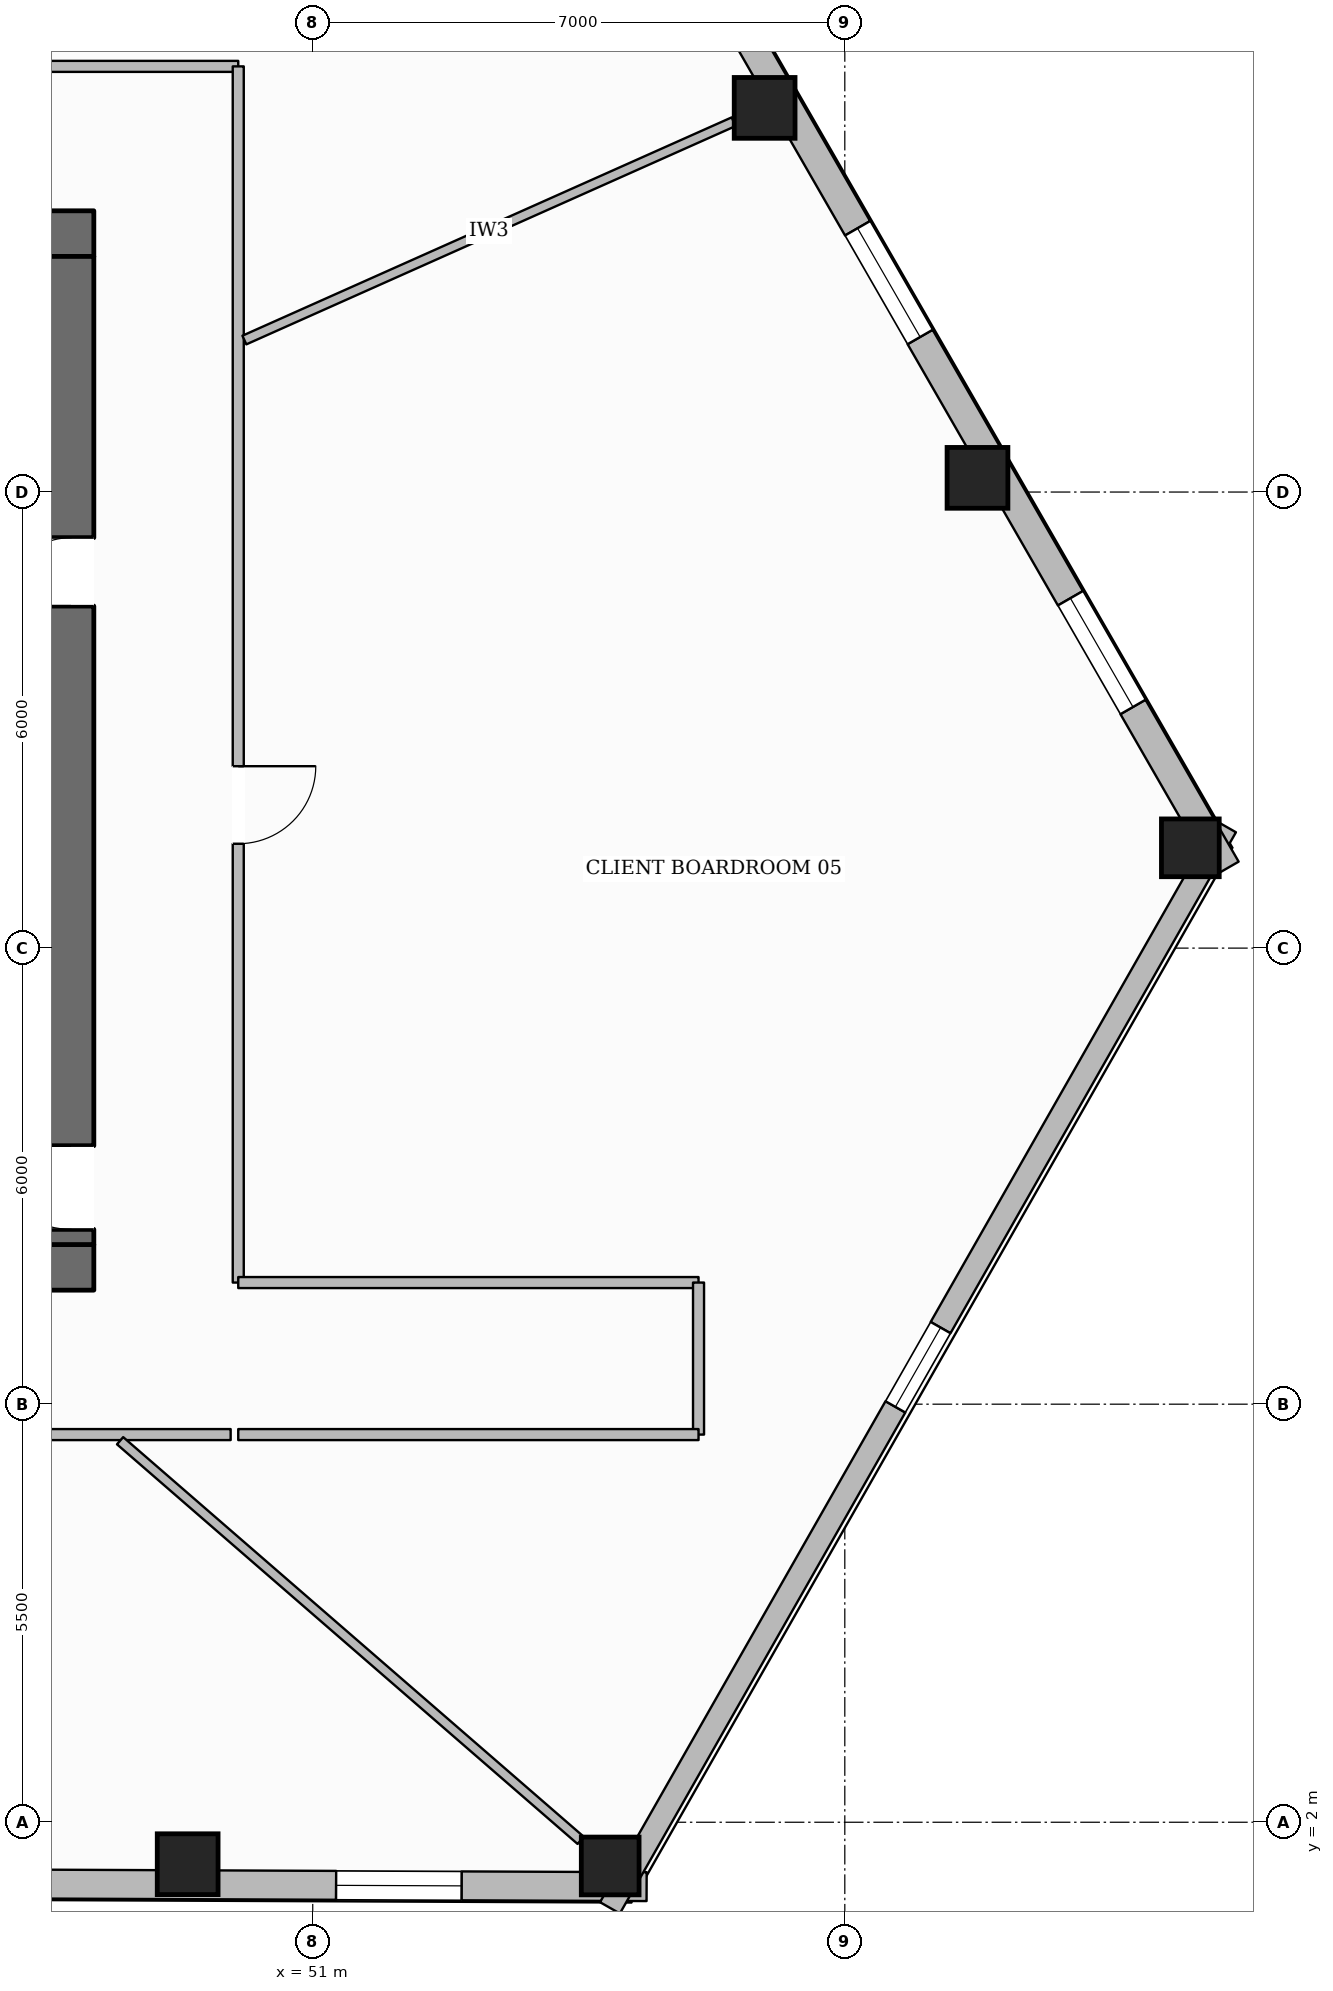
"""IFC4 building model, lengths in metres.
Left out: names, types, materials, properties, quantities, classifications, styles, units other than length and angle.
Written with IfcOpenShell. Run it as: python <this file> out.ifc"""

import sys

from ifc_helpers import new_model, si_unit, direction, frame, frame_2d, origin, origin_2d, place, context, subcontext, project, spatial, rectangle, hollow_rectangle, extrude, element, fill, save


model = new_model("IFC4")
c1 = context("Model", 3, precision=1e-05, world=origin(), true_north=direction((0.0, 1.0)))
c2 = subcontext(c1, "Body", "Model", "MODEL_VIEW")
j1 = project(units=[si_unit("LENGTHUNIT", "METRE"), si_unit("PLANEANGLEUNIT", "RADIAN")], contexts=[c1])
p1 = place(None, origin())
s1 = spatial("IfcSite", under=j1, at=p1, CompositionType="ELEMENT")
p2 = place(p1, origin())
s2 = spatial("IfcBuilding", under=s1, at=p2, CompositionType="ELEMENT")
p3 = place(p2, frame((0.0, 0.0, 36.8)))
s3 = spatial("IfcBuildingStorey", under=s2, at=p3, CompositionType="ELEMENT", Elevation=36.8)
p4 = place(p3, frame((27.88, 9.3, 0.0), z_axis=(0.0, 0.0, 1.0), x_axis=(1.0, 0.0, 0.0)))
e1 = element("IfcWall", 1, at=p4, inside=s3, PredefinedType="SOLIDWALL", context=c2, shape_type="SweptSolid", body=[
    extrude(rectangle(XDim=20.24, YDim=0.6, at=frame_2d((10.12, 0.0))), origin(), (0.0, 0.0, 1.0), 3.59),
])
p5 = place(p4, frame((10.62, 0.0, 0.0)))
e2 = element("IfcOpeningElement", 2, at=p5, cuts=e1, PredefinedType="OPENING", context=c2, shape_type="SweptSolid", body=[
    extrude(rectangle(XDim=1.4, YDim=2.2, at=frame_2d((0.7, 1.1))), frame((0.0, 0.31, 0.0), z_axis=(0.0, -1.0, 0.0), x_axis=(1.0, 0.0, 0.0)), (0.0, 0.0, 1.0), 0.62),
])
p6 = place(p3, frame((27.88, 22.9, 0.0), z_axis=(0.0, 0.0, 1.0), x_axis=(1.0, 0.0, 0.0)))
e3 = element("IfcWall", 3, at=p6, inside=s3, PredefinedType="SOLIDWALL", context=c2, shape_type="SweptSolid", body=[
    extrude(rectangle(XDim=20.24, YDim=0.6, at=frame_2d((10.12, 0.0))), origin(), (0.0, 0.0, 1.0), 3.59),
])
p7 = place(p6, frame((6.395, 0.0, 0.0)))
e4 = element("IfcOpeningElement", 4, at=p7, cuts=e3, PredefinedType="OPENING", context=c2, shape_type="SweptSolid", body=[
    extrude(rectangle(XDim=1.05, YDim=2.15, at=frame_2d((0.525, 1.075))), frame((0.0, 0.31, 0.0), z_axis=(0.0, -1.0, 0.0), x_axis=(1.0, 0.0, 0.0)), (0.0, 0.0, 1.0), 0.62),
])
p8 = place(p6, frame((12.795, 0.0, 0.0)))
e5 = element("IfcOpeningElement", 5, at=p8, cuts=e3, PredefinedType="OPENING", context=c2, shape_type="SweptSolid", body=[
    extrude(rectangle(XDim=1.05, YDim=2.15, at=frame_2d((0.525, 1.075))), frame((0.0, 0.31, 0.0), z_axis=(0.0, -1.0, 0.0), x_axis=(1.0, 0.0, 0.0)), (0.0, 0.0, 1.0), 0.62),
])
p9 = place(p3, frame((47.82, 9.6, 0.0), z_axis=(0.0, 0.0, 1.0), x_axis=(0.0, 1.0, 0.0)))
e6 = element("IfcWall", 6, at=p9, inside=s3, PredefinedType="SOLIDWALL", context=c2, shape_type="SweptSolid", body=[
    extrude(rectangle(XDim=13.0, YDim=0.6, at=frame_2d((6.5, 0.0))), origin(), (0.0, 0.0, 1.0), 3.59),
])
p10 = place(p9, frame((0.2, 0.0, 0.0)))
e7 = element("IfcOpeningElement", 7, at=p10, cuts=e6, PredefinedType="OPENING", context=c2, shape_type="SweptSolid", body=[
    extrude(rectangle(XDim=1.1, YDim=2.15, at=frame_2d((0.55, 1.075))), frame((0.0, 0.31, 0.0), z_axis=(0.0, -1.0, 0.0), x_axis=(1.0, 0.0, 0.0)), (0.0, 0.0, 1.0), 0.62),
])
p11 = place(p9, frame((8.4, 0.0, 0.0)))
e8 = element("IfcOpeningElement", 8, at=p11, cuts=e6, PredefinedType="OPENING", context=c2, shape_type="SweptSolid", body=[
    extrude(rectangle(XDim=0.9, YDim=2.1, at=frame_2d((0.45, 1.05))), frame((0.0, 0.31, 0.0), z_axis=(0.0, -1.0, 0.0), x_axis=(1.0, 0.0, 0.0)), (0.0, 0.0, 1.0), 0.62),
])
p12 = place(p3, frame((49.354, 1.448, 0.0), z_axis=(0.0, 0.0, 1.0), x_axis=(1.0, 0.0, 0.0)))
e9 = element("IfcColumn", 9, at=p12, inside=s3, PredefinedType="COLUMN", context=c2, shape_type="SweptSolid", body=[
    extrude(hollow_rectangle(XDim=0.8, YDim=0.8, WallThickness=0.036, at=origin_2d()), origin(), (0.0, 0.0, 1.0), 3.59),
])
for number, where, z_axis, x_axis in (
    (10, (54.913, 1.425, 0.0), (0.0, 0.0, 1.0), (1.0, 0.0, 0.0)),
    (11, (62.546, 14.82, 0.0), (0.0, 0.0, 1.0), (1.0, 0.0, 0.0)),
):
    element("IfcColumn", number, at=place(p3, frame(where, z_axis=z_axis, x_axis=x_axis)), inside=s3, PredefinedType="COLUMN", context=c2, shape_type="SweptSolid", body=[
        extrude(hollow_rectangle(XDim=0.76, YDim=0.76, WallThickness=0.035, at=origin_2d()), origin(), (0.0, 0.0, 1.0), 3.59),
    ])
for number, where, z_axis, x_axis in (
    (12, (59.746, 19.687, 0.0), (0.0, 0.0, 1.0), (1.0, 0.0, 0.0)),
    (13, (56.945, 24.554, 0.0), (0.0, 0.0, 1.0), (1.0, 0.0, 0.0)),
):
    element("IfcColumn", number, at=place(p3, frame(where, z_axis=z_axis, x_axis=x_axis)), inside=s3, PredefinedType="COLUMN", context=c2, shape_type="SweptSolid", body=[
        extrude(hollow_rectangle(XDim=0.8, YDim=0.8, WallThickness=0.036, at=origin_2d()), origin(), (0.0, 0.0, 1.0), 3.59),
    ])
p13 = place(p3, frame((55.393, 1.153, 0.0), z_axis=(0.0, 0.0, 1.0), x_axis=(-0.999991365452, 0.004155601268, 0.0)))
e14 = element("IfcWall", 14, at=p13, inside=s3, PredefinedType="STANDARD", context=c2, shape_type="SweptSolid", body=[
    extrude(rectangle(XDim=34.31, YDim=0.38, at=frame_2d((17.155, 0.0))), origin(), (0.0, 0.0, 1.0), 2.97),
])
p14 = place(p13, frame((30.229, 0.0, 0.65)))
e15 = element("IfcOpeningElement", 15, at=p14, cuts=e14, PredefinedType="OPENING", context=c2, shape_type="SweptSolid", body=[
    extrude(rectangle(XDim=1.65, YDim=1.75, at=frame_2d((0.825, 0.875))), frame((0.0, 0.2, 0.0), z_axis=(0.0, -1.0, 0.0), x_axis=(1.0, 0.0, 0.0)), (0.0, 0.0, 1.0), 0.4),
])
p15 = place(p13, frame((24.67, 0.0, 0.65)))
e16 = element("IfcOpeningElement", 16, at=p15, cuts=e14, PredefinedType="OPENING", context=c2, shape_type="SweptSolid", body=[
    extrude(rectangle(XDim=1.65, YDim=1.75, at=frame_2d((0.825, 0.875))), frame((0.0, 0.2, 0.0), z_axis=(0.0, -1.0, 0.0), x_axis=(1.0, 0.0, 0.0)), (0.0, 0.0, 1.0), 0.4),
])
p16 = place(p13, frame((13.552, 0.0, 0.65)))
e17 = element("IfcOpeningElement", 17, at=p16, cuts=e14, PredefinedType="OPENING", context=c2, shape_type="SweptSolid", body=[
    extrude(rectangle(XDim=1.65, YDim=1.75, at=frame_2d((0.825, 0.875))), frame((0.0, 0.2, 0.0), z_axis=(0.0, -1.0, 0.0), x_axis=(1.0, 0.0, 0.0)), (0.0, 0.0, 1.0), 0.4),
])
p17 = place(p13, frame((7.994, 0.0, 0.65)))
e18 = element("IfcOpeningElement", 18, at=p17, cuts=e14, PredefinedType="OPENING", context=c2, shape_type="SweptSolid", body=[
    extrude(rectangle(XDim=1.65, YDim=1.75, at=frame_2d((0.825, 0.875))), frame((0.0, 0.2, 0.0), z_axis=(0.0, -1.0, 0.0), x_axis=(1.0, 0.0, 0.0)), (0.0, 0.0, 1.0), 0.4),
])
p18 = place(p13, frame((2.435, 0.0, 0.65)))
e19 = element("IfcOpeningElement", 19, at=p18, cuts=e14, PredefinedType="OPENING", context=c2, shape_type="SweptSolid", body=[
    extrude(rectangle(XDim=1.65, YDim=1.75, at=frame_2d((0.825, 0.875))), frame((0.0, 0.2, 0.0), z_axis=(0.0, -1.0, 0.0), x_axis=(1.0, 0.0, 0.0)), (0.0, 0.0, 1.0), 0.4),
])
p19 = place(p3, frame((63.016, 15.098, 0.0), z_axis=(0.0, 0.0, 1.0), x_axis=(-0.495085083472, -0.86884449709, 0.0)))
e20 = element("IfcWall", 20, at=p19, inside=s3, PredefinedType="STANDARD", context=c2, shape_type="SweptSolid", body=[
    extrude(rectangle(XDim=16.372, YDim=0.3, at=frame_2d((8.186, 0.0))), origin(), (0.0, 0.0, 1.0), 2.97),
])
p20 = place(p19, frame((7.586, 0.0, 0.65)))
e21 = element("IfcOpeningElement", 21, at=p20, cuts=e20, PredefinedType="OPENING", context=c2, shape_type="SweptSolid", body=[
    extrude(rectangle(XDim=1.2, YDim=1.7, at=frame_2d((0.6, 0.85))), frame((0.0, 0.16, 0.0), z_axis=(0.0, -1.0, 0.0), x_axis=(1.0, 0.0, 0.0)), (0.0, 0.0, 1.0), 0.32),
])
p21 = place(p3, frame((45.74, 44.571, 0.0), z_axis=(0.0, 0.0, 1.0), x_axis=(0.498692886701, -0.866778751905, 0.0)))
e22 = element("IfcWall", 22, at=p21, inside=s3, PredefinedType="STANDARD", context=c2, shape_type="SweptSolid", body=[
    extrude(rectangle(XDim=34.643, YDim=0.38, at=frame_2d((17.322, 0.0))), origin(), (0.0, 0.0, 1.0), 2.97),
])
p22 = place(p21, frame((30.536, 0.0, 0.65)))
e23 = element("IfcOpeningElement", 23, at=p22, cuts=e22, PredefinedType="OPENING", context=c2, shape_type="SweptSolid", body=[
    extrude(rectangle(XDim=1.65, YDim=1.75, at=frame_2d((0.825, 0.875))), frame((0.0, 0.2, 0.0), z_axis=(0.0, -1.0, 0.0), x_axis=(1.0, 0.0, 0.0)), (0.0, 0.0, 1.0), 0.4),
])
p23 = place(p21, frame((24.92, 0.0, 0.65)))
e24 = element("IfcOpeningElement", 24, at=p23, cuts=e22, PredefinedType="OPENING", context=c2, shape_type="SweptSolid", body=[
    extrude(rectangle(XDim=1.65, YDim=1.75, at=frame_2d((0.825, 0.875))), frame((0.0, 0.2, 0.0), z_axis=(0.0, -1.0, 0.0), x_axis=(1.0, 0.0, 0.0)), (0.0, 0.0, 1.0), 0.4),
])
p24 = place(p21, frame((13.69, 0.0, 0.65)))
e25 = element("IfcOpeningElement", 25, at=p24, cuts=e22, PredefinedType="OPENING", context=c2, shape_type="SweptSolid", body=[
    extrude(rectangle(XDim=1.65, YDim=1.75, at=frame_2d((0.825, 0.875))), frame((0.0, 0.2, 0.0), z_axis=(0.0, -1.0, 0.0), x_axis=(1.0, 0.0, 0.0)), (0.0, 0.0, 1.0), 0.4),
])
p25 = place(p21, frame((8.074, 0.0, 0.65)))
e26 = element("IfcOpeningElement", 26, at=p25, cuts=e22, PredefinedType="OPENING", context=c2, shape_type="SweptSolid", body=[
    extrude(rectangle(XDim=1.65, YDim=1.75, at=frame_2d((0.825, 0.875))), frame((0.0, 0.2, 0.0), z_axis=(0.0, -1.0, 0.0), x_axis=(1.0, 0.0, 0.0)), (0.0, 0.0, 1.0), 0.4),
])
p26 = place(p21, frame((2.459, 0.0, 0.65)))
e27 = element("IfcOpeningElement", 27, at=p26, cuts=e22, PredefinedType="OPENING", context=c2, shape_type="SweptSolid", body=[
    extrude(rectangle(XDim=1.65, YDim=1.75, at=frame_2d((0.825, 0.875))), frame((0.0, 0.2, 0.0), z_axis=(0.0, -1.0, 0.0), x_axis=(1.0, 0.0, 0.0)), (0.0, 0.0, 1.0), 0.4),
])
p27 = place(p3, frame((39.0, 25.1, 0.0), z_axis=(0.0, 0.0, 1.0), x_axis=(1.0, 0.0, 0.0)))
e28 = element("IfcWall", 28, at=p27, inside=s3, PredefinedType="PARTITIONING", context=c2, shape_type="SweptSolid", body=[
    extrude(rectangle(XDim=11.02, YDim=0.145, at=frame_2d((5.51, 0.0))), origin(), (0.0, 0.0, 1.0), 3.59),
])
p28 = place(p3, frame((50.02, 25.1, 0.0), z_axis=(0.0, 0.0, 1.0), x_axis=(0.0, -1.0, 0.0)))
e29 = element("IfcWall", 29, at=p28, inside=s3, PredefinedType="PARTITIONING", context=c2, shape_type="SweptSolid", body=[
    extrude(rectangle(XDim=16.0, YDim=0.145, at=frame_2d((8.0, 0.0))), origin(), (0.0, 0.0, 1.0), 3.278),
])
p29 = place(p28, frame((9.207, 0.0, 0.0)))
e30 = element("IfcOpeningElement", 30, at=p29, cuts=e29, PredefinedType="OPENING", context=c2, shape_type="SweptSolid", body=[
    extrude(rectangle(XDim=1.02, YDim=2.15, at=frame_2d((0.51, 1.075))), frame((0.0, 0.083, 0.0), z_axis=(0.0, -1.0, 0.0), x_axis=(1.0, 0.0, 0.0)), (0.0, 0.0, 1.0), 0.165),
])
p30 = place(p3, frame((50.02, 9.1, 0.0), z_axis=(0.0, 0.0, 1.0), x_axis=(1.0, 0.0, 0.0)))
e31 = element("IfcWall", 31, at=p30, inside=s3, PredefinedType="PARTITIONING", context=c2, shape_type="SweptSolid", body=[
    extrude(rectangle(XDim=6.056, YDim=0.145, at=frame_2d((3.028, 0.0))), origin(), (0.0, 0.0, 1.0), 3.59),
])
p31 = place(p3, frame((56.076, 9.1, 0.0), z_axis=(0.0, 0.0, 1.0), x_axis=(0.0, -1.0, 0.0)))
e32 = element("IfcWall", 32, at=p31, inside=s3, PredefinedType="PARTITIONING", context=c2, shape_type="SweptSolid", body=[
    extrude(rectangle(XDim=2.0, YDim=0.145, at=frame_2d((1.0, 0.0))), origin(), (0.0, 0.0, 1.0), 3.59),
])
p32 = place(p3, frame((56.076, 7.1, 0.0), z_axis=(0.0, 0.0, 1.0), x_axis=(-1.0, 0.0, 0.0)))
e33 = element("IfcWall", 33, at=p32, inside=s3, PredefinedType="PARTITIONING", context=c2, shape_type="SweptSolid", body=[
    extrude(rectangle(XDim=6.056, YDim=0.145, at=frame_2d((3.028, 0.0))), origin(), (0.0, 0.0, 1.0), 3.59),
])
p33 = place(p3, frame((49.92, 7.1, 0.0), z_axis=(0.0, 0.0, 1.0), x_axis=(-1.0, 0.0, 0.0)))
e34 = element("IfcWall", 34, at=p33, inside=s3, PredefinedType="PARTITIONING", context=c2, shape_type="SweptSolid", body=[
    extrude(rectangle(XDim=23.84, YDim=0.145, at=frame_2d((11.92, 0.0))), origin(), (0.0, 0.0, 1.0), 3.278),
])
p34 = place(p33, frame((12.102, 0.0, 0.0)))
e35 = element("IfcOpeningElement", 35, at=p34, cuts=e34, PredefinedType="OPENING", context=c2, shape_type="SweptSolid", body=[
    extrude(rectangle(XDim=1.02, YDim=2.15, at=frame_2d((0.51, 1.075))), frame((0.0, 0.083, 0.0), z_axis=(0.0, -1.0, 0.0), x_axis=(1.0, 0.0, 0.0)), (0.0, 0.0, 1.0), 0.165),
])
p35 = place(p3, frame((50.101, 21.5, 0.0), z_axis=(0.0, 0.0, 1.0), x_axis=(0.913210626339, 0.407487854963, 0.0)))
e36 = element("IfcWall", 36, at=p35, inside=s3, PredefinedType="PARTITIONING", context=c2, shape_type="SweptSolid", body=[
    extrude(rectangle(XDim=7.048, YDim=0.125, at=frame_2d((3.524, 0.0))), origin(), (0.0, 0.0, 1.0), 3.057),
])
p36 = place(p3, frame((48.465, 7.02, 0.0), z_axis=(0.0, 0.0, 1.0), x_axis=(0.755333542889, -0.655340551916, 0.0)))
e37 = element("IfcWall", 37, at=p36, inside=s3, PredefinedType="PARTITIONING", context=c2, shape_type="SweptSolid", body=[
    extrude(rectangle(XDim=8.023, YDim=0.125, at=frame_2d((4.011, 0.0))), origin(), (0.0, 0.0, 1.0), 3.057),
])
p37 = place(p18, origin())
e38 = element("IfcWindow", 38, at=p37, inside=s3, PartitioningType="SINGLE_PANEL", PredefinedType="WINDOW", context=c2, shape_type="SweptSolid", body=[
    extrude(rectangle(XDim=1.65, YDim=1.75, at=frame_2d((0.825, 0.875))), frame((0.0, 0.03, 0.0), z_axis=(0.0, -1.0, 0.0), x_axis=(1.0, 0.0, 0.0)), (0.0, 0.0, 1.0), 0.06),
])
fill(e19, e38)
p38 = place(p22, origin())
e39 = element("IfcWindow", 39, at=p38, inside=s3, PartitioningType="SINGLE_PANEL", PredefinedType="WINDOW", context=c2, shape_type="SweptSolid", body=[
    extrude(rectangle(XDim=1.65, YDim=1.75, at=frame_2d((0.825, 0.875))), frame((0.0, 0.03, 0.0), z_axis=(0.0, -1.0, 0.0), x_axis=(1.0, 0.0, 0.0)), (0.0, 0.0, 1.0), 0.06),
])
fill(e23, e39)
p39 = place(p23, origin())
e40 = element("IfcWindow", 40, at=p39, inside=s3, PartitioningType="SINGLE_PANEL", PredefinedType="WINDOW", context=c2, shape_type="SweptSolid", body=[
    extrude(rectangle(XDim=1.65, YDim=1.75, at=frame_2d((0.825, 0.875))), frame((0.0, 0.03, 0.0), z_axis=(0.0, -1.0, 0.0), x_axis=(1.0, 0.0, 0.0)), (0.0, 0.0, 1.0), 0.06),
])
fill(e24, e40)
p40 = place(p20, origin())
e41 = element("IfcWindow", 41, at=p40, inside=s3, PartitioningType="SINGLE_PANEL", PredefinedType="WINDOW", context=c2, shape_type="SweptSolid", body=[
    extrude(rectangle(XDim=1.2, YDim=1.7, at=frame_2d((0.6, 0.85))), frame((0.0, 0.03, 0.0), z_axis=(0.0, -1.0, 0.0), x_axis=(1.0, 0.0, 0.0)), (0.0, 0.0, 1.0), 0.06),
])
fill(e21, e41)
p41 = place(p10, origin())
e42 = element("IfcDoor", 42, at=p41, inside=s3, OperationType="SINGLE_SWING_RIGHT", PredefinedType="DOOR", context=c2, shape_type="SweptSolid", body=[
    extrude(rectangle(XDim=1.1, YDim=2.15, at=frame_2d((0.55, 1.075))), frame((0.0, 0.025, 0.0), z_axis=(0.0, -1.0, 0.0), x_axis=(1.0, 0.0, 0.0)), (0.0, 0.0, 1.0), 0.05),
])
fill(e7, e42)
p42 = place(p11, origin())
e43 = element("IfcDoor", 43, at=p42, inside=s3, OperationType="SINGLE_SWING_LEFT", PredefinedType="DOOR", context=c2, shape_type="SweptSolid", body=[
    extrude(rectangle(XDim=0.9, YDim=2.1, at=frame_2d((0.45, 1.05))), frame((0.0, 0.025, 0.0), z_axis=(0.0, -1.0, 0.0), x_axis=(1.0, 0.0, 0.0)), (0.0, 0.0, 1.0), 0.05),
])
fill(e8, e43)
p43 = place(p29, origin())
e44 = element("IfcDoor", 44, at=p43, inside=s3, OperationType="SINGLE_SWING_LEFT", PredefinedType="DOOR", context=c2, shape_type="SweptSolid", body=[
    extrude(rectangle(XDim=1.02, YDim=2.15, at=frame_2d((0.51, 1.075))), frame((0.0, 0.025, 0.0), z_axis=(0.0, -1.0, 0.0), x_axis=(1.0, 0.0, 0.0)), (0.0, 0.0, 1.0), 0.05),
])
fill(e30, e44)
save(model, sys.argv[1])
